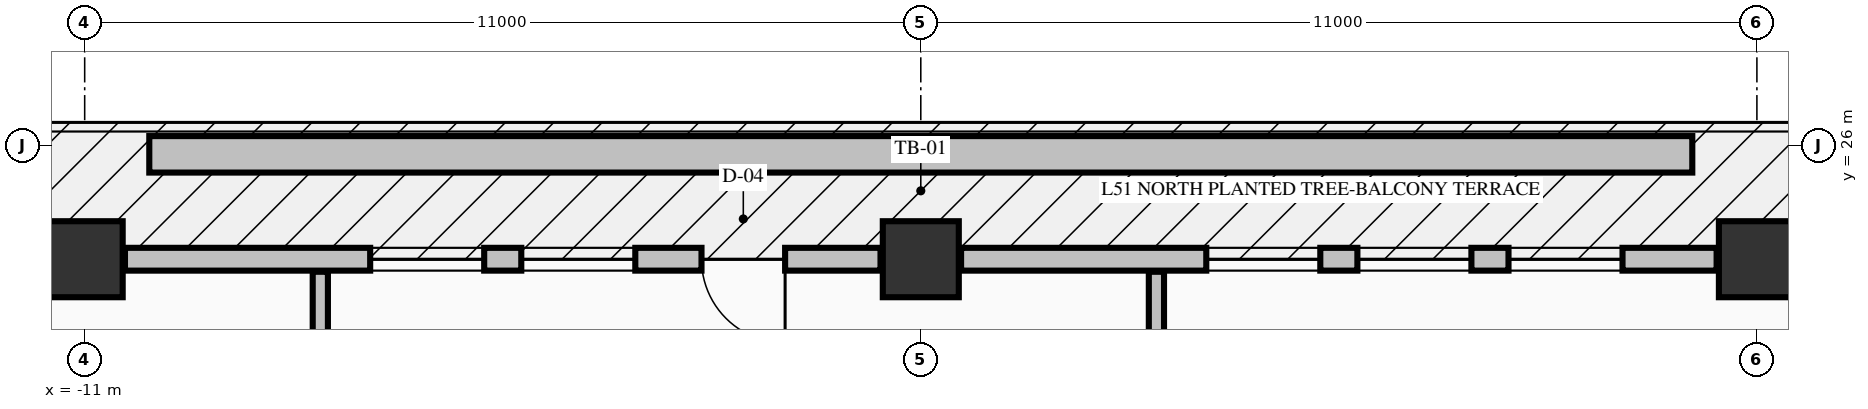
"""IFC4 building model, lengths in metres.
Left out: names, types, materials, properties, quantities, classifications, styles, units other than length and angle.
Written with IfcOpenShell. Run it as: python <this file> out.ifc"""

import sys

from ifc_helpers import new_model, si_unit, direction, frame, frame_2d, origin, origin_2d, place, context, subcontext, project, spatial, rectangle, extrude, element, fill, save


model = new_model("IFC4")
c1 = context("Model", 3, precision=1e-05, world=origin(), true_north=direction((0.0, 1.0)))
c2 = subcontext(c1, "Body", "Model", "MODEL_VIEW")
j1 = project(units=[si_unit("LENGTHUNIT", "METRE"), si_unit("PLANEANGLEUNIT", "RADIAN")], contexts=[c1])
p1 = place(None, origin())
s1 = spatial("IfcSite", under=j1, at=p1, CompositionType="ELEMENT")
p2 = place(p1, origin())
s2 = spatial("IfcBuilding", under=s1, at=p2, CompositionType="ELEMENT")
p3 = place(p2, frame((0.0, 0.0, 198.26)))
s3 = spatial("IfcBuildingStorey", under=s2, at=p3, CompositionType="ELEMENT", Elevation=198.26)
for number, where, z_axis, x_axis in (
    (1, (-11.0, 24.5, -0.25), (0.0, 0.0, 1.0), (1.0, 0.0, 0.0)),
    (2, (0.0, 24.5, -0.25), (0.0, 0.0, 1.0), (1.0, 0.0, 0.0)),
    (3, (11.0, 24.5, -0.25), (0.0, 0.0, 1.0), (1.0, 0.0, 0.0)),
):
    element("IfcColumn", number, at=place(p3, frame(where, z_axis=z_axis, x_axis=x_axis)), inside=s3, PredefinedType="COLUMN", context=c2, shape_type="SweptSolid", body=[
        extrude(rectangle(XDim=1.0, YDim=1.0, at=origin_2d()), origin(), (0.0, 0.0, 1.0), 3.4),
    ])
p4 = place(p3, frame((-0.53, 24.5, 0.0), z_axis=(0.0, 0.0, 1.0), x_axis=(-1.0, 0.0, 0.0)))
e4 = element("IfcWall", 4, at=p4, inside=s3, PredefinedType="STANDARD", context=c2, shape_type="SweptSolid", body=[
    extrude(rectangle(XDim=9.94, YDim=0.3, at=frame_2d((4.97, 0.0))), origin(), (0.0, 0.0, 1.0), 2.542),
])
p5 = place(p4, frame((1.255, 0.0, 0.0)))
e5 = element("IfcOpeningElement", 5, at=p5, cuts=e4, PredefinedType="OPENING", context=c2, shape_type="SweptSolid", body=[
    extrude(rectangle(XDim=1.1, YDim=2.15, at=frame_2d((0.55, 1.075))), frame((0.0, 0.16, 0.0), z_axis=(0.0, -1.0, 0.0), x_axis=(1.0, 0.0, 0.0)), (0.0, 0.0, 1.0), 0.32),
])
p6 = place(p4, frame((3.226, 0.0, 0.72)))
e6 = element("IfcOpeningElement", 6, at=p6, cuts=e4, PredefinedType="OPENING", context=c2, shape_type="SweptSolid", body=[
    extrude(rectangle(XDim=1.5, YDim=1.6, at=frame_2d((0.75, 0.8))), frame((0.0, 0.16, 0.0), z_axis=(0.0, -1.0, 0.0), x_axis=(1.0, 0.0, 0.0)), (0.0, 0.0, 1.0), 0.32),
])
p7 = place(p4, frame((5.214, 0.0, 0.72)))
e7 = element("IfcOpeningElement", 7, at=p7, cuts=e4, PredefinedType="OPENING", context=c2, shape_type="SweptSolid", body=[
    extrude(rectangle(XDim=1.5, YDim=1.6, at=frame_2d((0.75, 0.8))), frame((0.0, 0.16, 0.0), z_axis=(0.0, -1.0, 0.0), x_axis=(1.0, 0.0, 0.0)), (0.0, 0.0, 1.0), 0.32),
])
p8 = place(p3, frame((10.47, 24.5, 0.0), z_axis=(0.0, 0.0, 1.0), x_axis=(-1.0, 0.0, 0.0)))
e8 = element("IfcWall", 8, at=p8, inside=s3, PredefinedType="STANDARD", context=c2, shape_type="SweptSolid", body=[
    extrude(rectangle(XDim=9.94, YDim=0.3, at=frame_2d((4.97, 0.0))), origin(), (0.0, 0.0, 1.0), 2.542),
])
p9 = place(p8, frame((1.238, 0.0, 0.72)))
e9 = element("IfcOpeningElement", 9, at=p9, cuts=e8, PredefinedType="OPENING", context=c2, shape_type="SweptSolid", body=[
    extrude(rectangle(XDim=1.5, YDim=1.6, at=frame_2d((0.75, 0.8))), frame((0.0, 0.16, 0.0), z_axis=(0.0, -1.0, 0.0), x_axis=(1.0, 0.0, 0.0)), (0.0, 0.0, 1.0), 0.32),
])
p10 = place(p8, frame((3.226, 0.0, 0.72)))
e10 = element("IfcOpeningElement", 10, at=p10, cuts=e8, PredefinedType="OPENING", context=c2, shape_type="SweptSolid", body=[
    extrude(rectangle(XDim=1.5, YDim=1.6, at=frame_2d((0.75, 0.8))), frame((0.0, 0.16, 0.0), z_axis=(0.0, -1.0, 0.0), x_axis=(1.0, 0.0, 0.0)), (0.0, 0.0, 1.0), 0.32),
])
p11 = place(p8, frame((5.214, 0.0, 0.72)))
e11 = element("IfcOpeningElement", 11, at=p11, cuts=e8, PredefinedType="OPENING", context=c2, shape_type="SweptSolid", body=[
    extrude(rectangle(XDim=1.5, YDim=1.6, at=frame_2d((0.75, 0.8))), frame((0.0, 0.16, 0.0), z_axis=(0.0, -1.0, 0.0), x_axis=(1.0, 0.0, 0.0)), (0.0, 0.0, 1.0), 0.32),
])
for number, where, z_axis, x_axis in (
    (12, (-7.9, 15.078, 0.0), (0.0, 0.0, 1.0), (0.0, 1.0, 0.0)),
    (13, (3.1, 15.078, 0.0), (0.0, 0.0, 1.0), (0.0, 1.0, 0.0)),
):
    element("IfcWall", number, at=place(p3, frame(where, z_axis=z_axis, x_axis=x_axis)), inside=s3, PredefinedType="PARTITIONING", context=c2, shape_type="SweptSolid", body=[
        extrude(rectangle(XDim=9.257, YDim=0.2, at=frame_2d((4.628, 0.0))), origin(), (0.0, 0.0, 1.0), 3.15),
    ])
p12 = place(p3, frame((-10.15, 25.88, -0.04), z_axis=(0.0, 0.0, 1.0), x_axis=(1.0, 0.0, 0.0)))
e14 = element("IfcWall", 14, at=p12, inside=s3, PredefinedType="PARAPET", context=c2, shape_type="SweptSolid", body=[
    extrude(rectangle(XDim=20.3, YDim=0.48, at=frame_2d((10.15, 0.0))), origin(), (0.0, 0.0, 1.0), 0.52),
])
p13 = place(p5, origin())
e15 = element("IfcDoor", 15, at=p13, inside=s3, OperationType="SINGLE_SWING_LEFT", PredefinedType="DOOR", context=c2, shape_type="SweptSolid", body=[
    extrude(rectangle(XDim=1.1, YDim=2.15, at=frame_2d((0.55, 1.075))), frame((0.0, 0.025, 0.0), z_axis=(0.0, -1.0, 0.0), x_axis=(1.0, 0.0, 0.0)), (0.0, 0.0, 1.0), 0.05),
])
fill(e5, e15)
p14 = place(p6, origin())
e16 = element("IfcWindow", 16, at=p14, inside=s3, PartitioningType="SINGLE_PANEL", PredefinedType="WINDOW", context=c2, shape_type="SweptSolid", body=[
    extrude(rectangle(XDim=1.5, YDim=1.6, at=frame_2d((0.75, 0.8))), frame((0.0, 0.03, 0.0), z_axis=(0.0, -1.0, 0.0), x_axis=(1.0, 0.0, 0.0)), (0.0, 0.0, 1.0), 0.06),
])
fill(e6, e16)
p15 = place(p7, origin())
e17 = element("IfcWindow", 17, at=p15, inside=s3, PartitioningType="SINGLE_PANEL", PredefinedType="WINDOW", context=c2, shape_type="SweptSolid", body=[
    extrude(rectangle(XDim=1.5, YDim=1.6, at=frame_2d((0.75, 0.8))), frame((0.0, 0.03, 0.0), z_axis=(0.0, -1.0, 0.0), x_axis=(1.0, 0.0, 0.0)), (0.0, 0.0, 1.0), 0.06),
])
fill(e7, e17)
p16 = place(p9, origin())
e18 = element("IfcWindow", 18, at=p16, inside=s3, PartitioningType="SINGLE_PANEL", PredefinedType="WINDOW", context=c2, shape_type="SweptSolid", body=[
    extrude(rectangle(XDim=1.5, YDim=1.6, at=frame_2d((0.75, 0.8))), frame((0.0, 0.03, 0.0), z_axis=(0.0, -1.0, 0.0), x_axis=(1.0, 0.0, 0.0)), (0.0, 0.0, 1.0), 0.06),
])
fill(e9, e18)
p17 = place(p10, origin())
e19 = element("IfcWindow", 19, at=p17, inside=s3, PartitioningType="SINGLE_PANEL", PredefinedType="WINDOW", context=c2, shape_type="SweptSolid", body=[
    extrude(rectangle(XDim=1.5, YDim=1.6, at=frame_2d((0.75, 0.8))), frame((0.0, 0.03, 0.0), z_axis=(0.0, -1.0, 0.0), x_axis=(1.0, 0.0, 0.0)), (0.0, 0.0, 1.0), 0.06),
])
fill(e10, e19)
p18 = place(p11, origin())
e20 = element("IfcWindow", 20, at=p18, inside=s3, PartitioningType="SINGLE_PANEL", PredefinedType="WINDOW", context=c2, shape_type="SweptSolid", body=[
    extrude(rectangle(XDim=1.5, YDim=1.6, at=frame_2d((0.75, 0.8))), frame((0.0, 0.03, 0.0), z_axis=(0.0, -1.0, 0.0), x_axis=(1.0, 0.0, 0.0)), (0.0, 0.0, 1.0), 0.06),
])
fill(e11, e20)
save(model, sys.argv[1])
